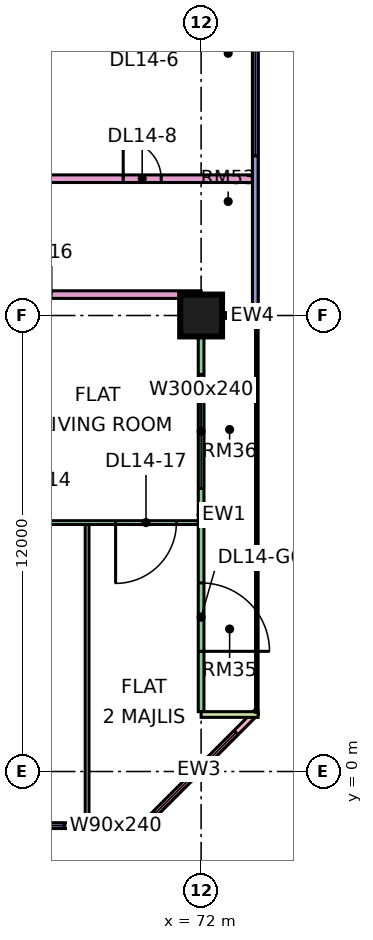
"""IFC4 building model, lengths in metres.
Left out: names, types, materials, properties, quantities, classifications, styles, units other than length and angle.
Written with IfcOpenShell. Run it as: python <this file> out.ifc"""

import sys

from ifc_helpers import new_model, si_unit, direction, frame, frame_2d, origin, origin_2d, place, context, subcontext, project, spatial, rectangle, extrude, element, fill, save


model = new_model("IFC4")
c1 = context("Model", 3, precision=1e-05, world=origin(), true_north=direction((0.0, 1.0)))
c2 = subcontext(c1, "Body", "Model", "MODEL_VIEW")
j1 = project(units=[si_unit("LENGTHUNIT", "METRE"), si_unit("PLANEANGLEUNIT", "RADIAN")], contexts=[c1])
p1 = place(None, origin())
s1 = spatial("IfcSite", under=j1, at=p1, CompositionType="ELEMENT")
p2 = place(p1, origin())
s2 = spatial("IfcBuilding", under=s1, at=p2, CompositionType="ELEMENT")
p3 = place(p2, frame((0.0, 0.0, 67.65)))
s3 = spatial("IfcBuildingStorey", under=s2, at=p3, CompositionType="ELEMENT", Elevation=67.65)
p4 = place(p3, frame((72.0, 12.0, 0.0), z_axis=(0.0, 0.0, 1.0), x_axis=(1.0, 0.0, 0.0)))
e1 = element("IfcColumn", 1, at=p4, inside=s3, PredefinedType="COLUMN", context=c2, shape_type="SweptSolid", body=[
    extrude(rectangle(XDim=1.1, YDim=1.1, at=origin_2d()), origin(), (0.0, 0.0, 1.0), 3.75),
])
p5 = place(p3, frame((60.075, -1.425, 0.0), z_axis=(0.0, 0.0, 1.0), x_axis=(1.0, 0.0, 0.0)))
e2 = element("IfcWall", 2, at=p5, inside=s3, PredefinedType="SOLIDWALL", context=c2, shape_type="SweptSolid", body=[
    extrude(rectangle(XDim=10.425, YDim=0.15, at=frame_2d((5.212, 0.0))), origin(), (0.0, 0.0, 1.0), 3.35),
])
p6 = place(p5, frame((0.562, 0.0, 0.45)))
e3 = element("IfcOpeningElement", 3, at=p6, cuts=e2, PredefinedType="OPENING", context=c2, shape_type="SweptSolid", body=[
    extrude(rectangle(XDim=1.8, YDim=2.4, at=frame_2d((0.9, 1.2))), frame((0.0, 0.085, 0.0), z_axis=(0.0, -1.0, 0.0), x_axis=(1.0, 0.0, 0.0)), (0.0, 0.0, 1.0), 0.17),
])
p7 = place(p5, frame((3.525, 0.0, 0.45)))
e4 = element("IfcOpeningElement", 4, at=p7, cuts=e2, PredefinedType="OPENING", context=c2, shape_type="SweptSolid", body=[
    extrude(rectangle(XDim=1.8, YDim=2.4, at=frame_2d((0.9, 1.2))), frame((0.0, 0.085, 0.0), z_axis=(0.0, -1.0, 0.0), x_axis=(1.0, 0.0, 0.0)), (0.0, 0.0, 1.0), 0.17),
])
p8 = place(p5, frame((6.525, 0.0, 0.45)))
e5 = element("IfcOpeningElement", 5, at=p8, cuts=e2, PredefinedType="OPENING", context=c2, shape_type="SweptSolid", body=[
    extrude(rectangle(XDim=1.8, YDim=2.4, at=frame_2d((0.9, 1.2))), frame((0.0, 0.085, 0.0), z_axis=(0.0, -1.0, 0.0), x_axis=(1.0, 0.0, 0.0)), (0.0, 0.0, 1.0), 0.17),
])
p9 = place(p5, frame((9.225, 0.0, 0.45)))
e6 = element("IfcOpeningElement", 6, at=p9, cuts=e2, PredefinedType="OPENING", context=c2, shape_type="SweptSolid", body=[
    extrude(rectangle(XDim=0.9, YDim=2.4, at=frame_2d((0.45, 1.2))), frame((0.0, 0.085, 0.0), z_axis=(0.0, -1.0, 0.0), x_axis=(1.0, 0.0, 0.0)), (0.0, 0.0, 1.0), 0.17),
])
p10 = place(p3, frame((70.447, -1.447, 0.0), z_axis=(0.0, 0.0, 1.0), x_axis=(0.707106781187, 0.707106781187, 0.0)))
e7 = element("IfcWall", 7, at=p10, inside=s3, PredefinedType="SOLIDWALL", context=c2, shape_type="SweptSolid", body=[
    extrude(rectangle(XDim=4.243, YDim=0.15, at=frame_2d((2.121, 0.0))), origin(), (0.0, 0.0, 1.0), 3.35),
])
p11 = place(p10, frame((0.498, 0.0, 0.45)))
e8 = element("IfcOpeningElement", 8, at=p11, cuts=e7, PredefinedType="OPENING", context=c2, shape_type="SweptSolid", body=[
    extrude(rectangle(XDim=3.0, YDim=2.4, at=frame_2d((1.5, 1.2))), frame((0.0, 0.085, 0.0), z_axis=(0.0, -1.0, 0.0), x_axis=(1.0, 0.0, 0.0)), (0.0, 0.0, 1.0), 0.17),
])
p12 = place(p3, frame((72.0, 1.575, 0.0), z_axis=(0.0, 0.0, 1.0), x_axis=(0.0, 1.0, 0.0)))
e9 = element("IfcWall", 9, at=p12, inside=s3, PredefinedType="SOLIDWALL", context=c2, shape_type="SweptSolid", body=[
    extrude(rectangle(XDim=10.35, YDim=0.15, at=frame_2d((5.175, 0.0))), origin(), (0.0, 0.0, 1.0), 3.35),
])
p13 = place(p12, frame((1.587, 0.0, 0.0)))
e10 = element("IfcOpeningElement", 10, at=p13, cuts=e9, PredefinedType="OPENING", context=c2, shape_type="SweptSolid", body=[
    extrude(rectangle(XDim=1.8, YDim=2.4, at=frame_2d((0.9, 1.2))), frame((0.0, 0.085, 0.0), z_axis=(0.0, -1.0, 0.0), x_axis=(1.0, 0.0, 0.0)), (0.0, 0.0, 1.0), 0.17),
])
p14 = place(p12, frame((5.875, 0.0, 0.45)))
e11 = element("IfcOpeningElement", 11, at=p14, cuts=e9, PredefinedType="OPENING", context=c2, shape_type="SweptSolid", body=[
    extrude(rectangle(XDim=3.0, YDim=2.4, at=frame_2d((1.5, 1.2))), frame((0.0, 0.085, 0.0), z_axis=(0.0, -1.0, 0.0), x_axis=(1.0, 0.0, 0.0)), (0.0, 0.0, 1.0), 0.17),
])
for number, where, z_axis, x_axis in (
    (12, (73.5, 1.5, 0.0), (0.0, 0.0, 1.0), (-1.0, 0.0, 0.0)),
    (13, (73.5, 12.0, 0.0), (0.0, 0.0, 1.0), (-1.0, 0.0, 0.0)),
):
    element("IfcWall", number, at=place(p3, frame(where, z_axis=z_axis, x_axis=x_axis)), inside=s3, PredefinedType="SOLIDWALL", context=c2, shape_type="SweptSolid", body=[
        extrude(rectangle(XDim=1.5, YDim=0.15, at=frame_2d((0.75, 0.0))), origin(), (0.0, 0.0, 1.0), 3.35),
    ])
p15 = place(p3, frame((73.425, 12.075, 0.0), z_axis=(0.0, 0.0, 1.0), x_axis=(0.0, 1.0, 0.0)))
e14 = element("IfcWall", 14, at=p15, inside=s3, PredefinedType="SOLIDWALL", context=c2, shape_type="SweptSolid", body=[
    extrude(rectangle(XDim=10.425, YDim=0.15, at=frame_2d((5.212, 0.0))), origin(), (0.0, 0.0, 1.0), 3.35),
])
p16 = place(p15, frame((4.125, 0.0, 0.45)))
e15 = element("IfcOpeningElement", 15, at=p16, cuts=e14, PredefinedType="OPENING", context=c2, shape_type="SweptSolid", body=[
    extrude(rectangle(XDim=3.0, YDim=2.4, at=frame_2d((1.5, 1.2))), frame((0.0, 0.085, 0.0), z_axis=(0.0, -1.0, 0.0), x_axis=(1.0, 0.0, 0.0)), (0.0, 0.0, 1.0), 0.17),
])
p17 = place(p15, frame((8.175, 0.0, 0.45)))
e16 = element("IfcOpeningElement", 16, at=p17, cuts=e14, PredefinedType="OPENING", context=c2, shape_type="SweptSolid", body=[
    extrude(rectangle(XDim=1.8, YDim=2.4, at=frame_2d((0.9, 1.2))), frame((0.0, 0.085, 0.0), z_axis=(0.0, -1.0, 0.0), x_axis=(1.0, 0.0, 0.0)), (0.0, 0.0, 1.0), 0.17),
])
p18 = place(p3, frame((40.65, 12.55, 0.0), z_axis=(0.0, 0.0, 1.0), x_axis=(1.0, 0.0, 0.0)))
e17 = element("IfcWall", 17, at=p18, inside=s3, PredefinedType="PARTITIONING", context=c2, shape_type="SweptSolid", body=[
    extrude(rectangle(XDim=31.35, YDim=0.2, at=frame_2d((15.675, 0.0))), origin(), (0.0, 0.0, 1.0), 3.35),
])
p19 = place(p18, frame((26.4, 0.0, 0.0)))
e18 = element("IfcOpeningElement", 18, at=p19, cuts=e17, PredefinedType="OPENING", context=c2, shape_type="SweptSolid", body=[
    extrude(rectangle(XDim=1.0, YDim=2.1, at=frame_2d((0.5, 1.05))), frame((0.0, 0.11, 0.0), z_axis=(0.0, -1.0, 0.0), x_axis=(1.0, 0.0, 0.0)), (0.0, 0.0, 1.0), 0.22),
])
p20 = place(p18, frame((1.05, 0.0, 0.0)))
e19 = element("IfcOpeningElement", 19, at=p20, cuts=e17, PredefinedType="OPENING", context=c2, shape_type="SweptSolid", body=[
    extrude(rectangle(XDim=1.0, YDim=2.1, at=frame_2d((0.5, 1.05))), frame((0.0, 0.11, 0.0), z_axis=(0.0, -1.0, 0.0), x_axis=(1.0, 0.0, 0.0)), (0.0, 0.0, 1.0), 0.22),
])
p21 = place(p3, frame((51.225, 15.6, 0.0), z_axis=(0.0, 0.0, 1.0), x_axis=(1.0, 0.0, 0.0)))
e20 = element("IfcWall", 20, at=p21, inside=s3, PredefinedType="PARTITIONING", context=c2, shape_type="SweptSolid", body=[
    extrude(rectangle(XDim=22.125, YDim=0.2, at=frame_2d((11.062, 0.0))), origin(), (0.0, 0.0, 1.0), 3.35),
])
p22 = place(p21, frame((18.725, 0.0, 0.0)))
e21 = element("IfcOpeningElement", 21, at=p22, cuts=e20, PredefinedType="OPENING", context=c2, shape_type="SweptSolid", body=[
    extrude(rectangle(XDim=1.0, YDim=2.1, at=frame_2d((0.5, 1.05))), frame((0.0, 0.11, 0.0), z_axis=(0.0, -1.0, 0.0), x_axis=(1.0, 0.0, 0.0)), (0.0, 0.0, 1.0), 0.22),
])
p23 = place(p21, frame((0.875, 0.0, 0.0)))
e22 = element("IfcOpeningElement", 22, at=p23, cuts=e20, PredefinedType="OPENING", context=c2, shape_type="SweptSolid", body=[
    extrude(rectangle(XDim=1.0, YDim=2.1, at=frame_2d((0.5, 1.05))), frame((0.0, 0.11, 0.0), z_axis=(0.0, -1.0, 0.0), x_axis=(1.0, 0.0, 0.0)), (0.0, 0.0, 1.0), 0.22),
])
p24 = place(p3, frame((56.95, 6.55, 0.0), z_axis=(0.0, 0.0, 1.0), x_axis=(1.0, 0.0, 0.0)))
e23 = element("IfcWall", 23, at=p24, inside=s3, PredefinedType="PARTITIONING", context=c2, shape_type="SweptSolid", body=[
    extrude(rectangle(XDim=14.976, YDim=0.1, at=frame_2d((7.488, 0.0))), origin(), (0.0, 0.0, 1.0), 3.35),
])
p25 = place(p24, frame((4.1, 0.0, 0.0)))
e24 = element("IfcOpeningElement", 24, at=p25, cuts=e23, PredefinedType="OPENING", context=c2, shape_type="SweptSolid", body=[
    extrude(rectangle(XDim=0.9, YDim=2.1, at=frame_2d((0.45, 1.05))), frame((0.0, 0.06, 0.0), z_axis=(0.0, -1.0, 0.0), x_axis=(1.0, 0.0, 0.0)), (0.0, 0.0, 1.0), 0.12),
])
p26 = place(p24, frame((7.1, 0.0, 0.0)))
e25 = element("IfcOpeningElement", 25, at=p26, cuts=e23, PredefinedType="OPENING", context=c2, shape_type="SweptSolid", body=[
    extrude(rectangle(XDim=0.9, YDim=2.1, at=frame_2d((0.45, 1.05))), frame((0.0, 0.06, 0.0), z_axis=(0.0, -1.0, 0.0), x_axis=(1.0, 0.0, 0.0)), (0.0, 0.0, 1.0), 0.12),
])
p27 = place(p24, frame((10.1, 0.0, 0.0)))
e26 = element("IfcOpeningElement", 26, at=p27, cuts=e23, PredefinedType="OPENING", context=c2, shape_type="SweptSolid", body=[
    extrude(rectangle(XDim=0.9, YDim=2.1, at=frame_2d((0.45, 1.05))), frame((0.0, 0.06, 0.0), z_axis=(0.0, -1.0, 0.0), x_axis=(1.0, 0.0, 0.0)), (0.0, 0.0, 1.0), 0.12),
])
p28 = place(p24, frame((12.8, 0.0, 0.0)))
e27 = element("IfcOpeningElement", 27, at=p28, cuts=e23, PredefinedType="OPENING", context=c2, shape_type="SweptSolid", body=[
    extrude(rectangle(XDim=1.6, YDim=2.1, at=frame_2d((0.8, 1.05))), frame((0.0, 0.06, 0.0), z_axis=(0.0, -1.0, 0.0), x_axis=(1.0, 0.0, 0.0)), (0.0, 0.0, 1.0), 0.12),
])
p29 = place(p24, frame((1.1, 0.0, 0.0)))
e28 = element("IfcOpeningElement", 28, at=p29, cuts=e23, PredefinedType="OPENING", context=c2, shape_type="SweptSolid", body=[
    extrude(rectangle(XDim=0.9, YDim=2.1, at=frame_2d((0.45, 1.05))), frame((0.0, 0.06, 0.0), z_axis=(0.0, -1.0, 0.0), x_axis=(1.0, 0.0, 0.0)), (0.0, 0.0, 1.0), 0.12),
])
p30 = place(p3, frame((69.0, -1.351, 0.0), z_axis=(0.0, 0.0, 1.0), x_axis=(0.0, 1.0, 0.0)))
e29 = element("IfcWall", 29, at=p30, inside=s3, PredefinedType="PARTITIONING", context=c2, shape_type="SweptSolid", body=[
    extrude(rectangle(XDim=7.851, YDim=0.1, at=frame_2d((3.926, 0.0))), origin(), (0.0, 0.0, 1.0), 3.35),
])
p31 = place(p8, origin())
e30 = element("IfcWindow", 30, at=p31, inside=s3, PartitioningType="SINGLE_PANEL", PredefinedType="WINDOW", context=c2, shape_type="SweptSolid", body=[
    extrude(rectangle(XDim=1.8, YDim=2.4, at=frame_2d((0.9, 1.2))), frame((0.0, 0.03, 0.0), z_axis=(0.0, -1.0, 0.0), x_axis=(1.0, 0.0, 0.0)), (0.0, 0.0, 1.0), 0.06),
])
fill(e5, e30)
p32 = place(p9, origin())
e31 = element("IfcWindow", 31, at=p32, inside=s3, PartitioningType="SINGLE_PANEL", PredefinedType="WINDOW", context=c2, shape_type="SweptSolid", body=[
    extrude(rectangle(XDim=0.9, YDim=2.4, at=frame_2d((0.45, 1.2))), frame((0.0, 0.03, 0.0), z_axis=(0.0, -1.0, 0.0), x_axis=(1.0, 0.0, 0.0)), (0.0, 0.0, 1.0), 0.06),
])
fill(e6, e31)
p33 = place(p11, origin())
e32 = element("IfcWindow", 32, at=p33, inside=s3, PartitioningType="SINGLE_PANEL", PredefinedType="WINDOW", context=c2, shape_type="SweptSolid", body=[
    extrude(rectangle(XDim=3.0, YDim=2.4, at=frame_2d((1.5, 1.2))), frame((0.0, 0.03, 0.0), z_axis=(0.0, -1.0, 0.0), x_axis=(1.0, 0.0, 0.0)), (0.0, 0.0, 1.0), 0.06),
])
fill(e8, e32)
p34 = place(p13, frame((1.8, 0.0, 0.0), z_axis=(0.0, 0.0, 1.0), x_axis=(-1.0, 0.0, 0.0)))
e33 = element("IfcDoor", 33, at=p34, inside=s3, OperationType="DOUBLE_DOOR_SINGLE_SWING", PredefinedType="DOOR", context=c2, shape_type="SweptSolid", body=[
    extrude(rectangle(XDim=1.8, YDim=2.4, at=frame_2d((0.9, 1.2))), frame((0.0, 0.025, 0.0), z_axis=(0.0, -1.0, 0.0), x_axis=(1.0, 0.0, 0.0)), (0.0, 0.0, 1.0), 0.05),
])
fill(e10, e33)
p35 = place(p14, origin())
e34 = element("IfcWindow", 34, at=p35, inside=s3, PartitioningType="SINGLE_PANEL", PredefinedType="WINDOW", context=c2, shape_type="SweptSolid", body=[
    extrude(rectangle(XDim=3.0, YDim=2.4, at=frame_2d((1.5, 1.2))), frame((0.0, 0.03, 0.0), z_axis=(0.0, -1.0, 0.0), x_axis=(1.0, 0.0, 0.0)), (0.0, 0.0, 1.0), 0.06),
])
fill(e11, e34)
p36 = place(p16, origin())
e35 = element("IfcWindow", 35, at=p36, inside=s3, PartitioningType="SINGLE_PANEL", PredefinedType="WINDOW", context=c2, shape_type="SweptSolid", body=[
    extrude(rectangle(XDim=3.0, YDim=2.4, at=frame_2d((1.5, 1.2))), frame((0.0, 0.03, 0.0), z_axis=(0.0, -1.0, 0.0), x_axis=(1.0, 0.0, 0.0)), (0.0, 0.0, 1.0), 0.06),
])
fill(e15, e35)
p37 = place(p22, origin())
e36 = element("IfcDoor", 36, at=p37, inside=s3, OperationType="SINGLE_SWING_LEFT", PredefinedType="DOOR", context=c2, shape_type="SweptSolid", body=[
    extrude(rectangle(XDim=1.0, YDim=2.1, at=frame_2d((0.5, 1.05))), frame((0.0, 0.025, 0.0), z_axis=(0.0, -1.0, 0.0), x_axis=(1.0, 0.0, 0.0)), (0.0, 0.0, 1.0), 0.05),
])
fill(e21, e36)
p38 = place(p28, frame((1.6, 0.0, 0.0), z_axis=(0.0, 0.0, 1.0), x_axis=(-1.0, 0.0, 0.0)))
e37 = element("IfcDoor", 37, at=p38, inside=s3, OperationType="DOUBLE_DOOR_SINGLE_SWING", PredefinedType="DOOR", context=c2, shape_type="SweptSolid", body=[
    extrude(rectangle(XDim=1.6, YDim=2.1, at=frame_2d((0.8, 1.05))), frame((0.0, 0.025, 0.0), z_axis=(0.0, -1.0, 0.0), x_axis=(1.0, 0.0, 0.0)), (0.0, 0.0, 1.0), 0.05),
])
fill(e27, e37)
save(model, sys.argv[1])
